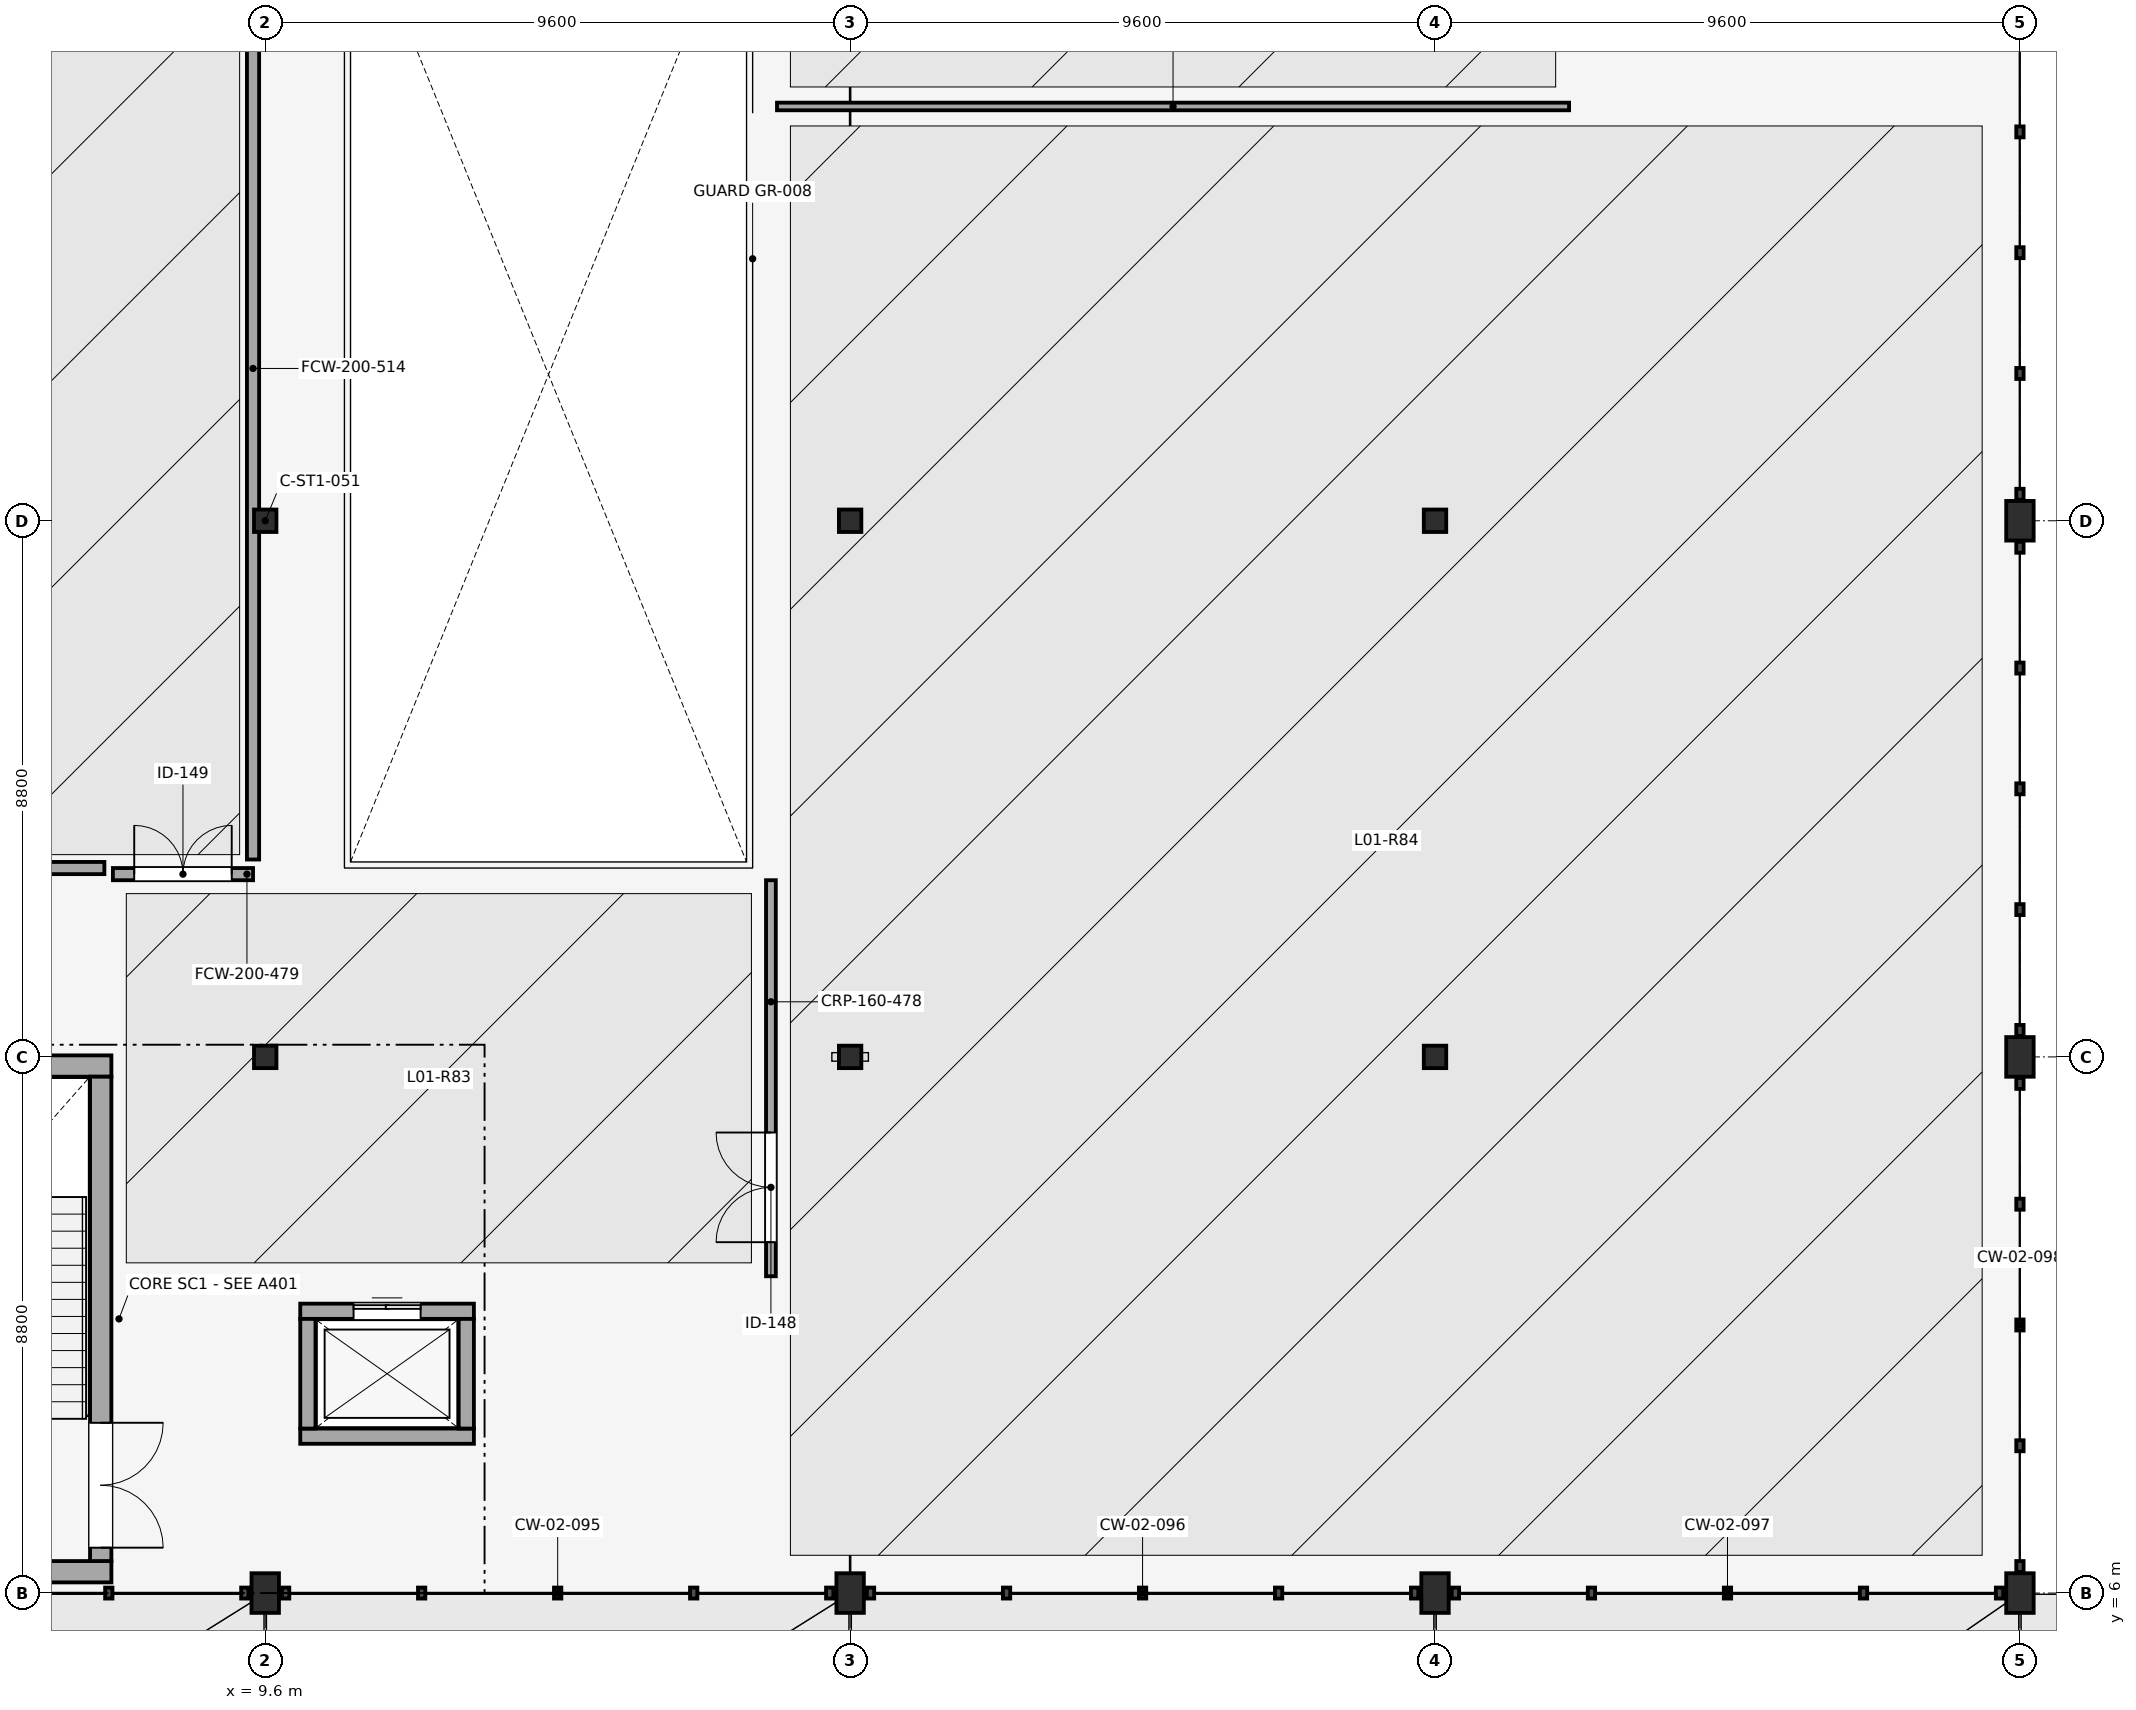
"""IFC4 building model, lengths in metres.
Left out: names, types, materials, properties, quantities, classifications, styles, units other than length and angle.
Written with IfcOpenShell. Run it as: python <this file> out.ifc"""

import sys

from ifc_helpers import new_model, si_unit, direction, frame, frame_2d, origin, origin_2d, place, context, subcontext, project, spatial, rectangle, i_section, extrude, element, fill, save


model = new_model("IFC4")
c1 = context("Model", 3, precision=1e-05, world=origin(), true_north=direction((0.0, 1.0)))
c2 = subcontext(c1, "Body", "Model", "MODEL_VIEW")
j1 = project(units=[si_unit("LENGTHUNIT", "METRE"), si_unit("PLANEANGLEUNIT", "RADIAN")], contexts=[c1])
p1 = place(None, origin())
s1 = spatial("IfcSite", under=j1, at=p1, CompositionType="ELEMENT")
p2 = place(p1, origin())
s2 = spatial("IfcBuilding", under=s1, at=p2, CompositionType="ELEMENT")
p3 = place(p2, frame((0.0, 0.0, 4.8)))
s3 = spatial("IfcBuildingStorey", under=s2, at=p3, CompositionType="ELEMENT", Elevation=4.8)
p4 = place(p3, frame((9.6, 6.0, 0.0), z_axis=(0.0, 0.0, 1.0), x_axis=(1.0, 0.0, 0.0)))
e1 = element("IfcColumn", 1, at=p4, inside=s3, PredefinedType="COLUMN", context=c2, shape_type="SweptSolid", body=[
    extrude(rectangle(XDim=0.45, YDim=0.65, at=origin_2d()), origin(), (0.0, 0.0, 1.0), 4.8),
])
for number, where, z_axis, x_axis in (
    (2, (9.6, 14.8, 0.0), (0.0, 0.0, 1.0), (1.0, 0.0, 0.0)),
    (3, (9.6, 23.6, 0.0), (0.0, 0.0, 1.0), (1.0, 0.0, 0.0)),
):
    element("IfcColumn", number, at=place(p3, frame(where, z_axis=z_axis, x_axis=x_axis)), inside=s3, PredefinedType="COLUMN", context=c2, shape_type="SweptSolid", body=[
        extrude(i_section(OverallWidth=0.368, OverallDepth=0.368, WebThickness=0.015, FlangeThickness=0.024, FilletRadius=0.025, at=origin_2d()), origin(), (0.0, 0.0, 1.0), 4.8),
    ])
p5 = place(p3, frame((19.2, 6.0, 0.0), z_axis=(0.0, 0.0, 1.0), x_axis=(1.0, 0.0, 0.0)))
e4 = element("IfcColumn", 4, at=p5, inside=s3, PredefinedType="COLUMN", context=c2, shape_type="SweptSolid", body=[
    extrude(rectangle(XDim=0.45, YDim=0.65, at=origin_2d()), origin(), (0.0, 0.0, 1.0), 4.8),
])
for number, where, z_axis, x_axis in (
    (5, (19.2, 14.8, 0.0), (0.0, 0.0, 1.0), (1.0, 0.0, 0.0)),
    (6, (19.2, 23.6, 0.0), (0.0, 0.0, 1.0), (1.0, 0.0, 0.0)),
):
    element("IfcColumn", number, at=place(p3, frame(where, z_axis=z_axis, x_axis=x_axis)), inside=s3, PredefinedType="COLUMN", context=c2, shape_type="SweptSolid", body=[
        extrude(i_section(OverallWidth=0.368, OverallDepth=0.368, WebThickness=0.015, FlangeThickness=0.024, FilletRadius=0.025, at=origin_2d()), origin(), (0.0, 0.0, 1.0), 4.8),
    ])
p6 = place(p3, frame((28.8, 6.0, 0.0), z_axis=(0.0, 0.0, 1.0), x_axis=(1.0, 0.0, 0.0)))
e7 = element("IfcColumn", 7, at=p6, inside=s3, PredefinedType="COLUMN", context=c2, shape_type="SweptSolid", body=[
    extrude(rectangle(XDim=0.45, YDim=0.65, at=origin_2d()), origin(), (0.0, 0.0, 1.0), 4.8),
])
for number, where, z_axis, x_axis in (
    (8, (28.8, 14.8, 0.0), (0.0, 0.0, 1.0), (1.0, 0.0, 0.0)),
    (9, (28.8, 23.6, 0.0), (0.0, 0.0, 1.0), (1.0, 0.0, 0.0)),
):
    element("IfcColumn", number, at=place(p3, frame(where, z_axis=z_axis, x_axis=x_axis)), inside=s3, PredefinedType="COLUMN", context=c2, shape_type="SweptSolid", body=[
        extrude(i_section(OverallWidth=0.368, OverallDepth=0.368, WebThickness=0.015, FlangeThickness=0.024, FilletRadius=0.025, at=origin_2d()), origin(), (0.0, 0.0, 1.0), 4.8),
    ])
for number, where, z_axis, x_axis in (
    (10, (38.4, 6.0, 0.0), (0.0, 0.0, 1.0), (1.0, 0.0, 0.0)),
    (11, (38.4, 14.8, 0.0), (0.0, 0.0, 1.0), (1.0, 0.0, 0.0)),
    (12, (38.4, 23.6, 0.0), (0.0, 0.0, 1.0), (1.0, 0.0, 0.0)),
):
    element("IfcColumn", number, at=place(p3, frame(where, z_axis=z_axis, x_axis=x_axis)), inside=s3, PredefinedType="COLUMN", context=c2, shape_type="SweptSolid", body=[
        extrude(rectangle(XDim=0.45, YDim=0.65, at=origin_2d()), origin(), (0.0, 0.0, 1.0), 4.8),
    ])
for number, where, z_axis, x_axis in (
    (13, (7.075, 6.35, 0.0), (0.0, 0.0, 1.0), (-1.0, 0.0, 0.0)),
    (14, (1.425, 14.65, 0.0), (0.0, 0.0, 1.0), (1.0, 0.0, 0.0)),
):
    element("IfcWall", number, at=place(p3, frame(where, z_axis=z_axis, x_axis=x_axis)), inside=s3, PredefinedType="SHEAR", context=c2, shape_type="SweptSolid", body=[
        extrude(rectangle(XDim=5.65, YDim=0.35, at=frame_2d((2.825, 0.0))), origin(), (0.0, 0.0, 1.0), 4.55),
    ])
p7 = place(p3, frame((6.9, 14.475, 0.0), z_axis=(0.0, 0.0, 1.0), x_axis=(0.0, -1.0, 0.0)))
e15 = element("IfcWall", 15, at=p7, inside=s3, PredefinedType="SHEAR", context=c2, shape_type="SweptSolid", body=[
    extrude(rectangle(XDim=7.95, YDim=0.35, at=frame_2d((3.975, 0.0))), origin(), (0.0, 0.0, 1.0), 4.55),
])
p8 = place(p7, frame((5.68, 0.0, 0.0)))
e16 = element("IfcOpeningElement", 16, at=p8, cuts=e15, PredefinedType="OPENING", context=c2, shape_type="SweptSolid", body=[
    extrude(rectangle(XDim=2.05, YDim=2.15, at=frame_2d((1.025, 1.075))), frame((0.0, 0.185, 0.0), z_axis=(0.0, -1.0, 0.0), x_axis=(1.0, 0.0, 0.0)), (0.0, 0.0, 1.0), 0.37),
])
p9 = place(p3, frame((13.025, 8.575, 0.0), z_axis=(0.0, 0.0, 1.0), x_axis=(-1.0, 0.0, 0.0)))
e17 = element("IfcWall", 17, at=p9, inside=s3, PredefinedType="SOLIDWALL", context=c2, shape_type="SweptSolid", body=[
    extrude(rectangle(XDim=2.85, YDim=0.25, at=frame_2d((1.425, 0.0))), origin(), (0.0, 0.0, 1.0), 4.55),
])
p10 = place(p3, frame((10.175, 10.625, 0.0), z_axis=(0.0, 0.0, 1.0), x_axis=(1.0, 0.0, 0.0)))
e18 = element("IfcWall", 18, at=p10, inside=s3, PredefinedType="SOLIDWALL", context=c2, shape_type="SweptSolid", body=[
    extrude(rectangle(XDim=2.85, YDim=0.25, at=frame_2d((1.425, 0.0))), origin(), (0.0, 0.0, 1.0), 4.55),
])
p11 = place(p10, frame((0.875, 0.0, 0.0)))
e19 = element("IfcOpeningElement", 19, at=p11, cuts=e18, PredefinedType="OPENING", context=c2, shape_type="SweptSolid", body=[
    extrude(rectangle(XDim=1.1, YDim=2.15, at=frame_2d((0.55, 1.075))), frame((0.0, 0.135, 0.0), z_axis=(0.0, -1.0, 0.0), x_axis=(1.0, 0.0, 0.0)), (0.0, 0.0, 1.0), 0.27),
])
for number, where, z_axis, x_axis in (
    (20, (10.3, 8.7, 0.0), (0.0, 0.0, 1.0), (0.0, 1.0, 0.0)),
    (21, (12.9, 10.5, 0.0), (0.0, 0.0, 1.0), (0.0, -1.0, 0.0)),
):
    element("IfcWall", number, at=place(p3, frame(where, z_axis=z_axis, x_axis=x_axis)), inside=s3, PredefinedType="SOLIDWALL", context=c2, shape_type="SweptSolid", body=[
        extrude(rectangle(XDim=1.8, YDim=0.25, at=frame_2d((0.9, 0.0))), origin(), (0.0, 0.0, 1.0), 4.55),
    ])
p12 = place(p3, frame((17.9, 11.2, 0.0), z_axis=(0.0, 0.0, 1.0), x_axis=(0.0, 1.0, 0.0)))
e22 = element("IfcWall", 22, at=p12, inside=s3, PredefinedType="PARTITIONING", context=c2, shape_type="SweptSolid", body=[
    extrude(rectangle(XDim=6.5, YDim=0.16, at=frame_2d((3.25, 0.0))), origin(), (0.0, 0.0, 1.0), 4.42),
])
p13 = place(p12, frame((0.559, 0.0, 0.0)))
e23 = element("IfcOpeningElement", 23, at=p13, cuts=e22, PredefinedType="OPENING", context=c2, shape_type="SweptSolid", body=[
    extrude(rectangle(XDim=1.8, YDim=2.15, at=frame_2d((0.9, 1.075))), frame((0.0, 0.09, 0.0), z_axis=(0.0, -1.0, 0.0), x_axis=(1.0, 0.0, 0.0)), (0.0, 0.0, 1.0), 0.18),
])
p14 = place(p3, frame((7.1, 17.8, 0.0), z_axis=(0.0, 0.0, 1.0), x_axis=(1.0, 0.0, 0.0)))
e24 = element("IfcWall", 24, at=p14, inside=s3, PredefinedType="PARTITIONING", context=c2, shape_type="SweptSolid", body=[
    extrude(rectangle(XDim=2.3, YDim=0.2, at=frame_2d((1.15, 0.0))), origin(), (0.0, 0.0, 1.0), 4.182),
])
p15 = place(p14, frame((0.35, 0.0, 0.0)))
e25 = element("IfcOpeningElement", 25, at=p15, cuts=e24, PredefinedType="OPENING", context=c2, shape_type="SweptSolid", body=[
    extrude(rectangle(XDim=1.6, YDim=2.15, at=frame_2d((0.8, 1.075))), frame((0.0, 0.11, 0.0), z_axis=(0.0, -1.0, 0.0), x_axis=(1.0, 0.0, 0.0)), (0.0, 0.0, 1.0), 0.22),
])
p16 = place(p3, frame((18.0, 30.4, 0.0), z_axis=(0.0, 0.0, 1.0), x_axis=(1.0, 0.0, 0.0)))
e26 = element("IfcWall", 26, at=p16, inside=s3, PredefinedType="PARTITIONING", context=c2, shape_type="SweptSolid", body=[
    extrude(rectangle(XDim=13.0, YDim=0.125, at=frame_2d((6.5, 0.0))), origin(), (0.0, 0.0, 1.0), 4.42),
])
p17 = place(p3, frame((0.05, 17.9, 0.0), z_axis=(0.0, 0.0, 1.0), x_axis=(1.0, 0.0, 0.0)))
e27 = element("IfcWall", 27, at=p17, inside=s3, PredefinedType="PARTITIONING", context=c2, shape_type="SweptSolid", body=[
    extrude(rectangle(XDim=6.91, YDim=0.2, at=frame_2d((3.455, 0.0))), origin(), (0.0, 0.0, 1.0), 4.182),
])
p18 = place(p3, frame((9.4, 18.04, 0.0), z_axis=(0.0, 0.0, 1.0), x_axis=(0.0, 1.0, 0.0)))
e28 = element("IfcWall", 28, at=p18, inside=s3, PredefinedType="PARTITIONING", context=c2, shape_type="SweptSolid", body=[
    extrude(rectangle(XDim=16.12, YDim=0.2, at=frame_2d((8.06, 0.0))), origin(), (0.0, 0.0, 1.0), 4.066),
])
p19 = place(p8, origin())
e29 = element("IfcDoor", 29, at=p19, inside=s3, OperationType="DOUBLE_DOOR_SINGLE_SWING", PredefinedType="DOOR", context=c2, shape_type="SweptSolid", body=[
    extrude(rectangle(XDim=2.05, YDim=2.15, at=frame_2d((1.025, 1.075))), frame((0.0, 0.025, 0.0), z_axis=(0.0, -1.0, 0.0), x_axis=(1.0, 0.0, 0.0)), (0.0, 0.0, 1.0), 0.05),
])
fill(e16, e29)
p20 = place(p11, origin())
e30 = element("IfcDoor", 30, at=p20, inside=s3, OperationType="DOUBLE_DOOR_SLIDING", PredefinedType="DOOR", context=c2, shape_type="SweptSolid", body=[
    extrude(rectangle(XDim=1.1, YDim=2.15, at=frame_2d((0.55, 1.075))), frame((0.0, 0.025, 0.0), z_axis=(0.0, -1.0, 0.0), x_axis=(1.0, 0.0, 0.0)), (0.0, 0.0, 1.0), 0.05),
])
fill(e19, e30)
p21 = place(p13, origin())
e31 = element("IfcDoor", 31, at=p21, inside=s3, OperationType="DOUBLE_DOOR_SINGLE_SWING", PredefinedType="DOOR", context=c2, shape_type="SweptSolid", body=[
    extrude(rectangle(XDim=1.8, YDim=2.15, at=frame_2d((0.9, 1.075))), frame((0.0, 0.025, 0.0), z_axis=(0.0, -1.0, 0.0), x_axis=(1.0, 0.0, 0.0)), (0.0, 0.0, 1.0), 0.05),
])
fill(e23, e31)
p22 = place(p15, origin())
e32 = element("IfcDoor", 32, at=p22, inside=s3, OperationType="DOUBLE_DOOR_SINGLE_SWING", PredefinedType="DOOR", context=c2, shape_type="SweptSolid", body=[
    extrude(rectangle(XDim=1.6, YDim=2.15, at=frame_2d((0.8, 1.075))), frame((0.0, 0.025, 0.0), z_axis=(0.0, -1.0, 0.0), x_axis=(1.0, 0.0, 0.0)), (0.0, 0.0, 1.0), 0.05),
])
fill(e25, e32)
save(model, sys.argv[1])
